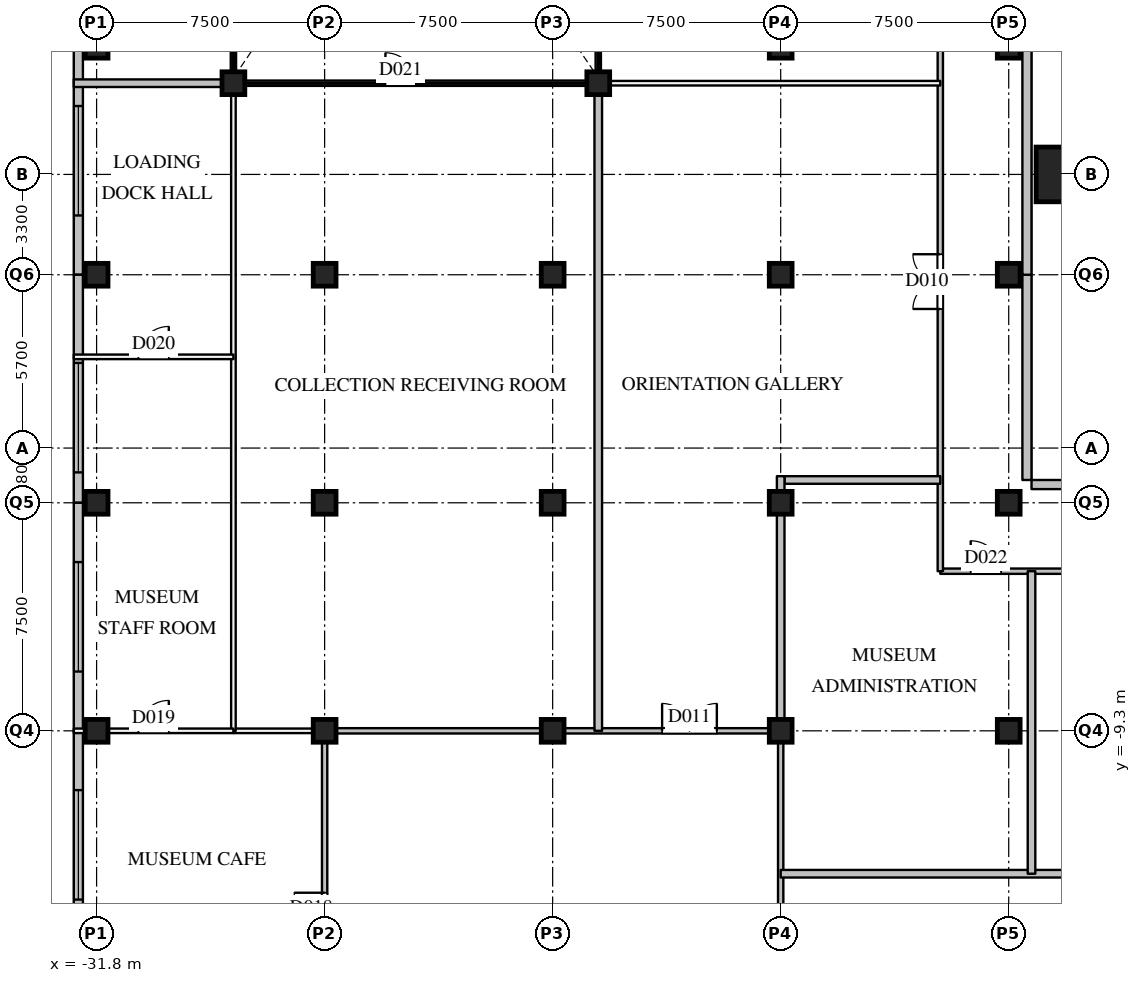
"""IFC4 building model, lengths in metres.
Left out: names, types, materials, properties, quantities, classifications, styles, units other than length and angle.
Written with IfcOpenShell. Run it as: python <this file> out.ifc"""

import sys

from ifc_helpers import new_model, si_unit, direction, frame, frame_2d, origin, origin_2d, place, context, subcontext, project, spatial, rectangle, extrude, element, fill, save


model = new_model("IFC4")
c1 = context("Model", 3, precision=1e-05, world=origin(), true_north=direction((0.0, 1.0)))
c2 = subcontext(c1, "Body", "Model", "MODEL_VIEW")
j1 = project(units=[si_unit("LENGTHUNIT", "METRE"), si_unit("PLANEANGLEUNIT", "RADIAN")], contexts=[c1])
p1 = place(None, origin())
s1 = spatial("IfcSite", under=j1, at=p1, CompositionType="ELEMENT")
p2 = place(p1, origin())
s2 = spatial("IfcBuilding", under=s1, at=p2, CompositionType="ELEMENT")
p3 = place(p2, origin())
s3 = spatial("IfcBuildingStorey", under=s2, at=p3, CompositionType="ELEMENT", Elevation=0.0)
p4 = place(p3, frame((0.0, 9.0, 0.0), z_axis=(0.0, 0.0, 1.0), x_axis=(1.0, 0.0, 0.0)))
e1 = element("IfcColumn", 1, at=p4, inside=s3, PredefinedType="COLUMN", context=c2, shape_type="SweptSolid", body=[
    extrude(rectangle(XDim=1.8, YDim=1.8, at=origin_2d()), origin(), (0.0, 0.0, 1.0), 8.0),
])
for number, where, z_axis, x_axis in (
    (2, (-31.8, -9.3, 0.0), (0.0, 0.0, 1.0), (1.0, 0.0, 0.0)),
    (3, (-31.8, -1.8, 0.0), (0.0, 0.0, 1.0), (1.0, 0.0, 0.0)),
    (4, (-31.8, 5.7, 0.0), (0.0, 0.0, 1.0), (1.0, 0.0, 0.0)),
    (5, (-31.8, 13.2, 0.0), (0.0, 0.0, 1.0), (1.0, 0.0, 0.0)),
    (6, (-24.3, -9.3, 0.0), (0.0, 0.0, 1.0), (1.0, 0.0, 0.0)),
    (7, (-24.3, -1.8, 0.0), (0.0, 0.0, 1.0), (1.0, 0.0, 0.0)),
    (8, (-24.3, 5.7, 0.0), (0.0, 0.0, 1.0), (1.0, 0.0, 0.0)),
    (9, (-16.8, -9.3, 0.0), (0.0, 0.0, 1.0), (1.0, 0.0, 0.0)),
    (10, (-16.8, -1.8, 0.0), (0.0, 0.0, 1.0), (1.0, 0.0, 0.0)),
    (11, (-16.8, 5.7, 0.0), (0.0, 0.0, 1.0), (1.0, 0.0, 0.0)),
    (12, (-9.3, -9.3, 0.0), (0.0, 0.0, 1.0), (1.0, 0.0, 0.0)),
    (13, (-9.3, -1.8, 0.0), (0.0, 0.0, 1.0), (1.0, 0.0, 0.0)),
    (14, (-9.3, 5.7, 0.0), (0.0, 0.0, 1.0), (1.0, 0.0, 0.0)),
    (15, (-9.3, 13.2, 0.0), (0.0, 0.0, 1.0), (1.0, 0.0, 0.0)),
    (16, (-1.8, -9.3, 0.0), (0.0, 0.0, 1.0), (1.0, 0.0, 0.0)),
    (17, (-1.8, -1.8, 0.0), (0.0, 0.0, 1.0), (1.0, 0.0, 0.0)),
    (18, (-1.8, 5.7, 0.0), (0.0, 0.0, 1.0), (1.0, 0.0, 0.0)),
    (19, (-1.8, 13.2, 0.0), (0.0, 0.0, 1.0), (1.0, 0.0, 0.0)),
    (20, (-27.3, 12.0, 0.0), (0.0, 0.0, 1.0), (1.0, 0.0, 0.0)),
    (21, (-15.3, 12.0, 0.0), (0.0, 0.0, 1.0), (1.0, 0.0, 0.0)),
):
    element("IfcColumn", number, at=place(p3, frame(where, z_axis=z_axis, x_axis=x_axis)), inside=s3, PredefinedType="COLUMN", context=c2, shape_type="SweptSolid", body=[
        extrude(rectangle(XDim=0.75, YDim=0.75, at=origin_2d()), origin(), (0.0, 0.0, 1.0), 8.0),
    ])
for number, where, z_axis, x_axis in (
    (22, (5.7, -1.2, 0.0), (0.0, 0.0, 1.0), (-1.0, 0.0, 0.0)),
    (23, (-1.2, -1.05, 0.0), (0.0, 0.0, 1.0), (0.0, 1.0, 0.0)),
):
    element("IfcWall", number, at=place(p3, frame(where, z_axis=z_axis, x_axis=x_axis)), inside=s3, PredefinedType="SOLIDWALL", context=c2, shape_type="SweptSolid", body=[
        extrude(rectangle(XDim=6.75, YDim=0.3, at=frame_2d((3.375, 0.0))), origin(), (0.0, 0.0, 1.0), 7.59),
    ])
p5 = place(p3, frame((-1.2, 5.7, 0.0), z_axis=(0.0, 0.0, 1.0), x_axis=(0.0, 1.0, 0.0)))
e24 = element("IfcWall", 24, at=p5, inside=s3, PredefinedType="SOLIDWALL", context=c2, shape_type="SweptSolid", body=[
    extrude(rectangle(XDim=7.5, YDim=0.3, at=frame_2d((3.75, 0.0))), origin(), (0.0, 0.0, 1.0), 7.59),
])
p6 = place(p3, frame((-32.4, 13.2, 0.0), z_axis=(0.0, 0.0, 1.0), x_axis=(0.0, -1.0, 0.0)))
e25 = element("IfcWall", 25, at=p6, inside=s3, PredefinedType="SOLIDWALL", context=c2, shape_type="SweptSolid", body=[
    extrude(rectangle(XDim=7.5, YDim=0.3, at=frame_2d((3.75, 0.0))), origin(), (0.0, 0.0, 1.0), 7.59),
])
p7 = place(p6, frame((1.95, 0.0, 0.9)))
e26 = element("IfcOpeningElement", 26, at=p7, cuts=e25, PredefinedType="OPENING", context=c2, shape_type="SweptSolid", body=[
    extrude(rectangle(XDim=3.6, YDim=3.0, at=frame_2d((1.8, 1.5))), frame((0.0, 0.16, 0.0), z_axis=(0.0, -1.0, 0.0), x_axis=(1.0, 0.0, 0.0)), (0.0, 0.0, 1.0), 0.32),
])
p8 = place(p3, frame((-32.4, 5.7, 0.0), z_axis=(0.0, 0.0, 1.0), x_axis=(0.0, -1.0, 0.0)))
e27 = element("IfcWall", 27, at=p8, inside=s3, PredefinedType="SOLIDWALL", context=c2, shape_type="SweptSolid", body=[
    extrude(rectangle(XDim=7.5, YDim=0.3, at=frame_2d((3.75, 0.0))), origin(), (0.0, 0.0, 1.0), 7.59),
])
p9 = place(p8, frame((2.9, 0.0, 0.9)))
e28 = element("IfcOpeningElement", 28, at=p9, cuts=e27, PredefinedType="OPENING", context=c2, shape_type="SweptSolid", body=[
    extrude(rectangle(XDim=3.6, YDim=3.0, at=frame_2d((1.8, 1.5))), frame((0.0, 0.16, 0.0), z_axis=(0.0, -1.0, 0.0), x_axis=(1.0, 0.0, 0.0)), (0.0, 0.0, 1.0), 0.32),
])
p10 = place(p3, frame((-32.4, -1.8, 0.0), z_axis=(0.0, 0.0, 1.0), x_axis=(0.0, -1.0, 0.0)))
e29 = element("IfcWall", 29, at=p10, inside=s3, PredefinedType="SOLIDWALL", context=c2, shape_type="SweptSolid", body=[
    extrude(rectangle(XDim=7.5, YDim=0.3, at=frame_2d((3.75, 0.0))), origin(), (0.0, 0.0, 1.0), 7.59),
])
p11 = place(p10, frame((1.95, 0.0, 0.9)))
e30 = element("IfcOpeningElement", 30, at=p11, cuts=e29, PredefinedType="OPENING", context=c2, shape_type="SweptSolid", body=[
    extrude(rectangle(XDim=3.6, YDim=3.0, at=frame_2d((1.8, 1.5))), frame((0.0, 0.16, 0.0), z_axis=(0.0, -1.0, 0.0), x_axis=(1.0, 0.0, 0.0)), (0.0, 0.0, 1.0), 0.32),
])
p12 = place(p3, frame((-32.4, -9.3, 0.0), z_axis=(0.0, 0.0, 1.0), x_axis=(0.0, -1.0, 0.0)))
e31 = element("IfcWall", 31, at=p12, inside=s3, PredefinedType="SOLIDWALL", context=c2, shape_type="SweptSolid", body=[
    extrude(rectangle(XDim=7.5, YDim=0.3, at=frame_2d((3.75, 0.0))), origin(), (0.0, 0.0, 1.0), 7.59),
])
p13 = place(p12, frame((1.95, 0.0, 0.9)))
e32 = element("IfcOpeningElement", 32, at=p13, cuts=e31, PredefinedType="OPENING", context=c2, shape_type="SweptSolid", body=[
    extrude(rectangle(XDim=3.6, YDim=3.0, at=frame_2d((1.8, 1.5))), frame((0.0, 0.16, 0.0), z_axis=(0.0, -1.0, 0.0), x_axis=(1.0, 0.0, 0.0)), (0.0, 0.0, 1.0), 0.32),
])
p14 = place(p3, frame((-24.3, -9.3, 0.0), z_axis=(0.0, 0.0, 1.0), x_axis=(1.0, 0.0, 0.0)))
e33 = element("IfcWall", 33, at=p14, inside=s3, PredefinedType="PARTITIONING", context=c2, shape_type="SweptSolid", body=[
    extrude(rectangle(XDim=15.0, YDim=0.175, at=frame_2d((7.5, 0.0))), origin(), (0.0, 0.0, 1.0), 6.79),
])
p15 = place(p14, frame((11.1, 0.0, 0.0)))
e34 = element("IfcOpeningElement", 34, at=p15, cuts=e33, PredefinedType="OPENING", context=c2, shape_type="SweptSolid", body=[
    extrude(rectangle(XDim=1.8, YDim=2.1, at=frame_2d((0.9, 1.05))), frame((0.0, 0.097, 0.0), z_axis=(0.0, -1.0, 0.0), x_axis=(1.0, 0.0, 0.0)), (0.0, 0.0, 1.0), 0.195),
])
p16 = place(p3, frame((-4.05, -4.05, 0.0), z_axis=(0.0, 0.0, 1.0), x_axis=(1.0, 0.0, 0.0)))
e35 = element("IfcWall", 35, at=p16, inside=s3, PredefinedType="PARTITIONING", context=c2, shape_type="SweptSolid", body=[
    extrude(rectangle(XDim=18.0, YDim=0.175, at=frame_2d((9.0, 0.0))), origin(), (0.0, 0.0, 1.0), 6.79),
])
p17 = place(p16, frame((1.0, 0.0, 0.0)))
e36 = element("IfcOpeningElement", 36, at=p17, cuts=e35, PredefinedType="OPENING", context=c2, shape_type="SweptSolid", body=[
    extrude(rectangle(XDim=1.0, YDim=2.1, at=frame_2d((0.5, 1.05))), frame((0.0, 0.097, 0.0), z_axis=(0.0, -1.0, 0.0), x_axis=(1.0, 0.0, 0.0)), (0.0, 0.0, 1.0), 0.195),
])
p18 = place(p16, frame((10.0, 0.0, 0.0)))
e37 = element("IfcOpeningElement", 37, at=p18, cuts=e35, PredefinedType="OPENING", context=c2, shape_type="SweptSolid", body=[
    extrude(rectangle(XDim=1.0, YDim=2.1, at=frame_2d((0.5, 1.05))), frame((0.0, 0.097, 0.0), z_axis=(0.0, -1.0, 0.0), x_axis=(1.0, 0.0, 0.0)), (0.0, 0.0, 1.0), 0.195),
])
p19 = place(p3, frame((-27.3, 12.0, 0.0), z_axis=(0.0, 0.0, 1.0), x_axis=(1.0, 0.0, 0.0)))
e38 = element("IfcWall", 38, at=p19, inside=s3, PredefinedType="PARTITIONING", context=c2, shape_type="SweptSolid", body=[
    extrude(rectangle(XDim=12.0, YDim=0.175, at=frame_2d((6.0, 0.0))), origin(), (0.0, 0.0, 1.0), 7.59),
])
p20 = place(p19, frame((5.0, 0.0, 0.0)))
e39 = element("IfcOpeningElement", 39, at=p20, cuts=e38, PredefinedType="OPENING", context=c2, shape_type="SweptSolid", body=[
    extrude(rectangle(XDim=1.0, YDim=2.1, at=frame_2d((0.5, 1.05))), frame((0.0, 0.097, 0.0), z_axis=(0.0, -1.0, 0.0), x_axis=(1.0, 0.0, 0.0)), (0.0, 0.0, 1.0), 0.195),
])
p21 = place(p3, frame((-27.3, 12.0, 0.0), z_axis=(0.0, 0.0, 1.0), x_axis=(0.0, 1.0, 0.0)))
e40 = element("IfcWall", 40, at=p21, inside=s3, PredefinedType="PARTITIONING", context=c2, shape_type="SweptSolid", body=[
    extrude(rectangle(XDim=35.35, YDim=0.175, at=frame_2d((17.675, 0.0))), origin(), (0.0, 0.0, 1.0), 6.79),
])
p22 = place(p21, frame((18.4, 0.0, 0.0)))
e41 = element("IfcOpeningElement", 41, at=p22, cuts=e40, PredefinedType="OPENING", context=c2, shape_type="SweptSolid", body=[
    extrude(rectangle(XDim=1.8, YDim=2.1, at=frame_2d((0.9, 1.05))), frame((0.0, 0.097, 0.0), z_axis=(0.0, -1.0, 0.0), x_axis=(1.0, 0.0, 0.0)), (0.0, 0.0, 1.0), 0.195),
])
p23 = place(p21, frame((23.7, 0.0, 0.0)))
e42 = element("IfcOpeningElement", 42, at=p23, cuts=e40, PredefinedType="OPENING", context=c2, shape_type="SweptSolid", body=[
    extrude(rectangle(XDim=1.8, YDim=2.1, at=frame_2d((0.9, 1.05))), frame((0.0, 0.097, 0.0), z_axis=(0.0, -1.0, 0.0), x_axis=(1.0, 0.0, 0.0)), (0.0, 0.0, 1.0), 0.195),
])
p24 = place(p21, frame((4.688, 0.0, 0.0)))
e43 = element("IfcOpeningElement", 43, at=p24, cuts=e40, PredefinedType="OPENING", context=c2, shape_type="SweptSolid", body=[
    extrude(rectangle(XDim=1.0, YDim=2.1, at=frame_2d((0.5, 1.05))), frame((0.0, 0.097, 0.0), z_axis=(0.0, -1.0, 0.0), x_axis=(1.0, 0.0, 0.0)), (0.0, 0.0, 1.0), 0.195),
])
p25 = place(p3, frame((-24.3, -20.95, 0.0), z_axis=(0.0, 0.0, 1.0), x_axis=(0.0, 1.0, 0.0)))
e44 = element("IfcWall", 44, at=p25, inside=s3, PredefinedType="PARTITIONING", context=c2, shape_type="SweptSolid", body=[
    extrude(rectangle(XDim=11.65, YDim=0.175, at=frame_2d((5.825, 0.0))), origin(), (0.0, 0.0, 1.0), 6.79),
])
p26 = place(p25, frame((5.325, 0.0, 0.0)))
e45 = element("IfcOpeningElement", 45, at=p26, cuts=e44, PredefinedType="OPENING", context=c2, shape_type="SweptSolid", body=[
    extrude(rectangle(XDim=1.0, YDim=2.1, at=frame_2d((0.5, 1.05))), frame((0.0, 0.097, 0.0), z_axis=(0.0, -1.0, 0.0), x_axis=(1.0, 0.0, 0.0)), (0.0, 0.0, 1.0), 0.195),
])
p27 = place(p3, frame((-15.3, 12.0, 0.0), z_axis=(0.0, 0.0, 1.0), x_axis=(0.0, 1.0, 0.0)))
e46 = element("IfcWall", 46, at=p27, inside=s3, PredefinedType="PARTITIONING", context=c2, shape_type="SweptSolid", body=[
    extrude(rectangle(XDim=18.0, YDim=0.175, at=frame_2d((9.0, 0.0))), origin(), (0.0, 0.0, 1.0), 7.59),
])
p28 = place(p3, frame((-9.3, -32.55, 0.0), z_axis=(0.0, 0.0, 1.0), x_axis=(0.0, 1.0, 0.0)))
e47 = element("IfcWall", 47, at=p28, inside=s3, PredefinedType="PARTITIONING", context=c2, shape_type="SweptSolid", body=[
    extrude(rectangle(XDim=23.25, YDim=0.175, at=frame_2d((11.625, 0.0))), origin(), (0.0, 0.0, 1.0), 6.79),
])
p29 = place(p3, frame((-4.05, -4.05, 0.0), z_axis=(0.0, 0.0, 1.0), x_axis=(0.0, 1.0, 0.0)))
e48 = element("IfcWall", 48, at=p29, inside=s3, PredefinedType="PARTITIONING", context=c2, shape_type="SweptSolid", body=[
    extrude(rectangle(XDim=63.0, YDim=0.175, at=frame_2d((31.5, 0.0))), origin(), (0.0, 0.0, 1.0), 6.79),
])
p30 = place(p29, frame((51.535, 0.0, 0.0)))
e49 = element("IfcOpeningElement", 49, at=p30, cuts=e48, PredefinedType="OPENING", context=c2, shape_type="SweptSolid", body=[
    extrude(rectangle(XDim=1.8, YDim=2.1, at=frame_2d((0.9, 1.05))), frame((0.0, 0.097, 0.0), z_axis=(0.0, -1.0, 0.0), x_axis=(1.0, 0.0, 0.0)), (0.0, 0.0, 1.0), 0.195),
])
p31 = place(p29, frame((23.25, 0.0, 0.0)))
e50 = element("IfcOpeningElement", 50, at=p31, cuts=e48, PredefinedType="OPENING", context=c2, shape_type="SweptSolid", body=[
    extrude(rectangle(XDim=1.8, YDim=2.1, at=frame_2d((0.9, 1.05))), frame((0.0, 0.097, 0.0), z_axis=(0.0, -1.0, 0.0), x_axis=(1.0, 0.0, 0.0)), (0.0, 0.0, 1.0), 0.195),
])
p32 = place(p29, frame((38.85, 0.0, 0.0)))
e51 = element("IfcOpeningElement", 51, at=p32, cuts=e48, PredefinedType="OPENING", context=c2, shape_type="SweptSolid", body=[
    extrude(rectangle(XDim=1.8, YDim=2.1, at=frame_2d((0.9, 1.05))), frame((0.0, 0.097, 0.0), z_axis=(0.0, -1.0, 0.0), x_axis=(1.0, 0.0, 0.0)), (0.0, 0.0, 1.0), 0.195),
])
p33 = place(p29, frame((8.625, 0.0, 0.0)))
e52 = element("IfcOpeningElement", 52, at=p33, cuts=e48, PredefinedType="OPENING", context=c2, shape_type="SweptSolid", body=[
    extrude(rectangle(XDim=1.8, YDim=2.1, at=frame_2d((0.9, 1.05))), frame((0.0, 0.097, 0.0), z_axis=(0.0, -1.0, 0.0), x_axis=(1.0, 0.0, 0.0)), (0.0, 0.0, 1.0), 0.195),
])
p34 = place(p3, frame((-27.3, -9.3, 0.0), z_axis=(0.0, 0.0, 1.0), x_axis=(1.0, 0.0, 0.0)))
e53 = element("IfcWall", 53, at=p34, inside=s3, PredefinedType="PARTITIONING", context=c2, shape_type="SweptSolid", body=[
    extrude(rectangle(XDim=3.0, YDim=0.15, at=frame_2d((1.5, 0.0))), origin(), (0.0, 0.0, 1.0), 6.79),
])
p35 = place(p3, frame((-15.3, 12.0, 0.0), z_axis=(0.0, 0.0, 1.0), x_axis=(1.0, 0.0, 0.0)))
e54 = element("IfcWall", 54, at=p35, inside=s3, PredefinedType="PARTITIONING", context=c2, shape_type="SweptSolid", body=[
    extrude(rectangle(XDim=11.25, YDim=0.15, at=frame_2d((5.625, 0.0))), origin(), (0.0, 0.0, 1.0), 6.79),
])
p36 = place(p3, frame((-27.3, -9.3, 0.0), z_axis=(0.0, 0.0, 1.0), x_axis=(0.0, 1.0, 0.0)))
e55 = element("IfcWall", 55, at=p36, inside=s3, PredefinedType="PARTITIONING", context=c2, shape_type="SweptSolid", body=[
    extrude(rectangle(XDim=21.3, YDim=0.15, at=frame_2d((10.65, 0.0))), origin(), (0.0, 0.0, 1.0), 6.79),
])
p37 = place(p3, frame((-32.55, -9.3, 0.0), z_axis=(0.0, 0.0, 1.0), x_axis=(1.0, 0.0, 0.0)))
e56 = element("IfcWall", 56, at=p37, inside=s3, PredefinedType="PARTITIONING", context=c2, shape_type="SweptSolid", body=[
    extrude(rectangle(XDim=5.25, YDim=0.15, at=frame_2d((2.625, 0.0))), origin(), (0.0, 0.0, 1.0), 6.79),
])
p38 = place(p37, frame((2.125, 0.0, 0.0)))
e57 = element("IfcOpeningElement", 57, at=p38, cuts=e56, PredefinedType="OPENING", context=c2, shape_type="SweptSolid", body=[
    extrude(rectangle(XDim=1.0, YDim=2.1, at=frame_2d((0.5, 1.05))), frame((0.0, 0.085, 0.0), z_axis=(0.0, -1.0, 0.0), x_axis=(1.0, 0.0, 0.0)), (0.0, 0.0, 1.0), 0.17),
])
p39 = place(p3, frame((-32.55, 3.0, 0.0), z_axis=(0.0, 0.0, 1.0), x_axis=(1.0, 0.0, 0.0)))
e58 = element("IfcWall", 58, at=p39, inside=s3, PredefinedType="PARTITIONING", context=c2, shape_type="SweptSolid", body=[
    extrude(rectangle(XDim=5.25, YDim=0.15, at=frame_2d((2.625, 0.0))), origin(), (0.0, 0.0, 1.0), 6.79),
])
p40 = place(p39, frame((2.125, 0.0, 0.0)))
e59 = element("IfcOpeningElement", 59, at=p40, cuts=e58, PredefinedType="OPENING", context=c2, shape_type="SweptSolid", body=[
    extrude(rectangle(XDim=1.0, YDim=2.1, at=frame_2d((0.5, 1.05))), frame((0.0, 0.085, 0.0), z_axis=(0.0, -1.0, 0.0), x_axis=(1.0, 0.0, 0.0)), (0.0, 0.0, 1.0), 0.17),
])
p41 = place(p3, frame((-9.3, -14.0, 0.0), z_axis=(0.0, 0.0, 1.0), x_axis=(1.0, 0.0, 0.0)))
e60 = element("IfcWall", 60, at=p41, inside=s3, PredefinedType="PARTITIONING", context=c2, shape_type="SweptSolid", body=[
    extrude(rectangle(XDim=13.425, YDim=0.25, at=frame_2d((6.712, 0.0))), origin(), (0.0, 0.0, 1.0), 6.79),
])
p42 = place(p3, frame((-9.175, -1.05, 0.0), z_axis=(0.0, 0.0, 1.0), x_axis=(1.0, 0.0, 0.0)))
e61 = element("IfcWall", 61, at=p42, inside=s3, PredefinedType="PARTITIONING", context=c2, shape_type="SweptSolid", body=[
    extrude(rectangle(XDim=5.125, YDim=0.25, at=frame_2d((2.562, 0.0))), origin(), (0.0, 0.0, 1.0), 6.79),
])
p43 = place(p3, frame((-32.55, 12.0, 0.0), z_axis=(0.0, 0.0, 1.0), x_axis=(1.0, 0.0, 0.0)))
e62 = element("IfcWall", 62, at=p43, inside=s3, PredefinedType="PARTITIONING", context=c2, shape_type="SweptSolid", body=[
    extrude(rectangle(XDim=5.25, YDim=0.25, at=frame_2d((2.625, 0.0))), origin(), (0.0, 0.0, 1.0), 6.79),
])
p44 = place(p3, frame((-15.3, -9.3, 0.0), z_axis=(0.0, 0.0, 1.0), x_axis=(0.0, 1.0, 0.0)))
e63 = element("IfcWall", 63, at=p44, inside=s3, PredefinedType="PARTITIONING", context=c2, shape_type="SweptSolid", body=[
    extrude(rectangle(XDim=21.3, YDim=0.25, at=frame_2d((10.65, 0.0))), origin(), (0.0, 0.0, 1.0), 6.79),
])
p45 = place(p3, frame((-9.3, -9.3, 0.0), z_axis=(0.0, 0.0, 1.0), x_axis=(0.0, 1.0, 0.0)))
e64 = element("IfcWall", 64, at=p45, inside=s3, PredefinedType="PARTITIONING", context=c2, shape_type="SweptSolid", body=[
    extrude(rectangle(XDim=8.375, YDim=0.25, at=frame_2d((4.188, 0.0))), origin(), (0.0, 0.0, 1.0), 6.79),
])
p46 = place(p3, frame((-1.05, -14.0, 0.0), z_axis=(0.0, 0.0, 1.0), x_axis=(0.0, 1.0, 0.0)))
e65 = element("IfcWall", 65, at=p46, inside=s3, PredefinedType="PARTITIONING", context=c2, shape_type="SweptSolid", body=[
    extrude(rectangle(XDim=9.95, YDim=0.25, at=frame_2d((4.975, 0.0))), origin(), (0.0, 0.0, 1.0), 6.79),
])
p47 = place(p7, origin())
e66 = element("IfcWindow", 66, at=p47, inside=s3, PartitioningType="SINGLE_PANEL", PredefinedType="WINDOW", context=c2, shape_type="SweptSolid", body=[
    extrude(rectangle(XDim=3.6, YDim=3.0, at=frame_2d((1.8, 1.5))), frame((0.0, 0.03, 0.0), z_axis=(0.0, -1.0, 0.0), x_axis=(1.0, 0.0, 0.0)), (0.0, 0.0, 1.0), 0.06),
])
fill(e26, e66)
p48 = place(p9, origin())
e67 = element("IfcWindow", 67, at=p48, inside=s3, PartitioningType="SINGLE_PANEL", PredefinedType="WINDOW", context=c2, shape_type="SweptSolid", body=[
    extrude(rectangle(XDim=3.6, YDim=3.0, at=frame_2d((1.8, 1.5))), frame((0.0, 0.03, 0.0), z_axis=(0.0, -1.0, 0.0), x_axis=(1.0, 0.0, 0.0)), (0.0, 0.0, 1.0), 0.06),
])
fill(e28, e67)
p49 = place(p11, origin())
e68 = element("IfcWindow", 68, at=p49, inside=s3, PartitioningType="SINGLE_PANEL", PredefinedType="WINDOW", context=c2, shape_type="SweptSolid", body=[
    extrude(rectangle(XDim=3.6, YDim=3.0, at=frame_2d((1.8, 1.5))), frame((0.0, 0.03, 0.0), z_axis=(0.0, -1.0, 0.0), x_axis=(1.0, 0.0, 0.0)), (0.0, 0.0, 1.0), 0.06),
])
fill(e30, e68)
p50 = place(p13, origin())
e69 = element("IfcWindow", 69, at=p50, inside=s3, PartitioningType="SINGLE_PANEL", PredefinedType="WINDOW", context=c2, shape_type="SweptSolid", body=[
    extrude(rectangle(XDim=3.6, YDim=3.0, at=frame_2d((1.8, 1.5))), frame((0.0, 0.03, 0.0), z_axis=(0.0, -1.0, 0.0), x_axis=(1.0, 0.0, 0.0)), (0.0, 0.0, 1.0), 0.06),
])
fill(e32, e69)
p51 = place(p33, origin())
e70 = element("IfcDoor", 70, at=p51, inside=s3, OperationType="DOUBLE_DOOR_SINGLE_SWING", PredefinedType="DOOR", context=c2, shape_type="SweptSolid", body=[
    extrude(rectangle(XDim=1.8, YDim=2.1, at=frame_2d((0.9, 1.05))), frame((0.0, 0.025, 0.0), z_axis=(0.0, -1.0, 0.0), x_axis=(1.0, 0.0, 0.0)), (0.0, 0.0, 1.0), 0.05),
])
fill(e52, e70)
p52 = place(p15, origin())
e71 = element("IfcDoor", 71, at=p52, inside=s3, OperationType="DOUBLE_DOOR_SINGLE_SWING", PredefinedType="DOOR", context=c2, shape_type="SweptSolid", body=[
    extrude(rectangle(XDim=1.8, YDim=2.1, at=frame_2d((0.9, 1.05))), frame((0.0, 0.025, 0.0), z_axis=(0.0, -1.0, 0.0), x_axis=(1.0, 0.0, 0.0)), (0.0, 0.0, 1.0), 0.05),
])
fill(e34, e71)
p53 = place(p26, origin())
e72 = element("IfcDoor", 72, at=p53, inside=s3, OperationType="SINGLE_SWING_RIGHT", PredefinedType="DOOR", context=c2, shape_type="SweptSolid", body=[
    extrude(rectangle(XDim=1.0, YDim=2.1, at=frame_2d((0.5, 1.05))), frame((0.0, 0.025, 0.0), z_axis=(0.0, -1.0, 0.0), x_axis=(1.0, 0.0, 0.0)), (0.0, 0.0, 1.0), 0.05),
])
fill(e45, e72)
p54 = place(p38, origin())
e73 = element("IfcDoor", 73, at=p54, inside=s3, OperationType="SINGLE_SWING_RIGHT", PredefinedType="DOOR", context=c2, shape_type="SweptSolid", body=[
    extrude(rectangle(XDim=1.0, YDim=2.1, at=frame_2d((0.5, 1.05))), frame((0.0, 0.025, 0.0), z_axis=(0.0, -1.0, 0.0), x_axis=(1.0, 0.0, 0.0)), (0.0, 0.0, 1.0), 0.05),
])
fill(e57, e73)
p55 = place(p40, origin())
e74 = element("IfcDoor", 74, at=p55, inside=s3, OperationType="SINGLE_SWING_RIGHT", PredefinedType="DOOR", context=c2, shape_type="SweptSolid", body=[
    extrude(rectangle(XDim=1.0, YDim=2.1, at=frame_2d((0.5, 1.05))), frame((0.0, 0.025, 0.0), z_axis=(0.0, -1.0, 0.0), x_axis=(1.0, 0.0, 0.0)), (0.0, 0.0, 1.0), 0.05),
])
fill(e59, e74)
p56 = place(p20, origin())
e75 = element("IfcDoor", 75, at=p56, inside=s3, OperationType="SINGLE_SWING_LEFT", PredefinedType="DOOR", context=c2, shape_type="SweptSolid", body=[
    extrude(rectangle(XDim=1.0, YDim=2.1, at=frame_2d((0.5, 1.05))), frame((0.0, 0.025, 0.0), z_axis=(0.0, -1.0, 0.0), x_axis=(1.0, 0.0, 0.0)), (0.0, 0.0, 1.0), 0.05),
])
fill(e39, e75)
p57 = place(p17, origin())
e76 = element("IfcDoor", 76, at=p57, inside=s3, OperationType="SINGLE_SWING_LEFT", PredefinedType="DOOR", context=c2, shape_type="SweptSolid", body=[
    extrude(rectangle(XDim=1.0, YDim=2.1, at=frame_2d((0.5, 1.05))), frame((0.0, 0.025, 0.0), z_axis=(0.0, -1.0, 0.0), x_axis=(1.0, 0.0, 0.0)), (0.0, 0.0, 1.0), 0.05),
])
fill(e36, e76)
save(model, sys.argv[1])
